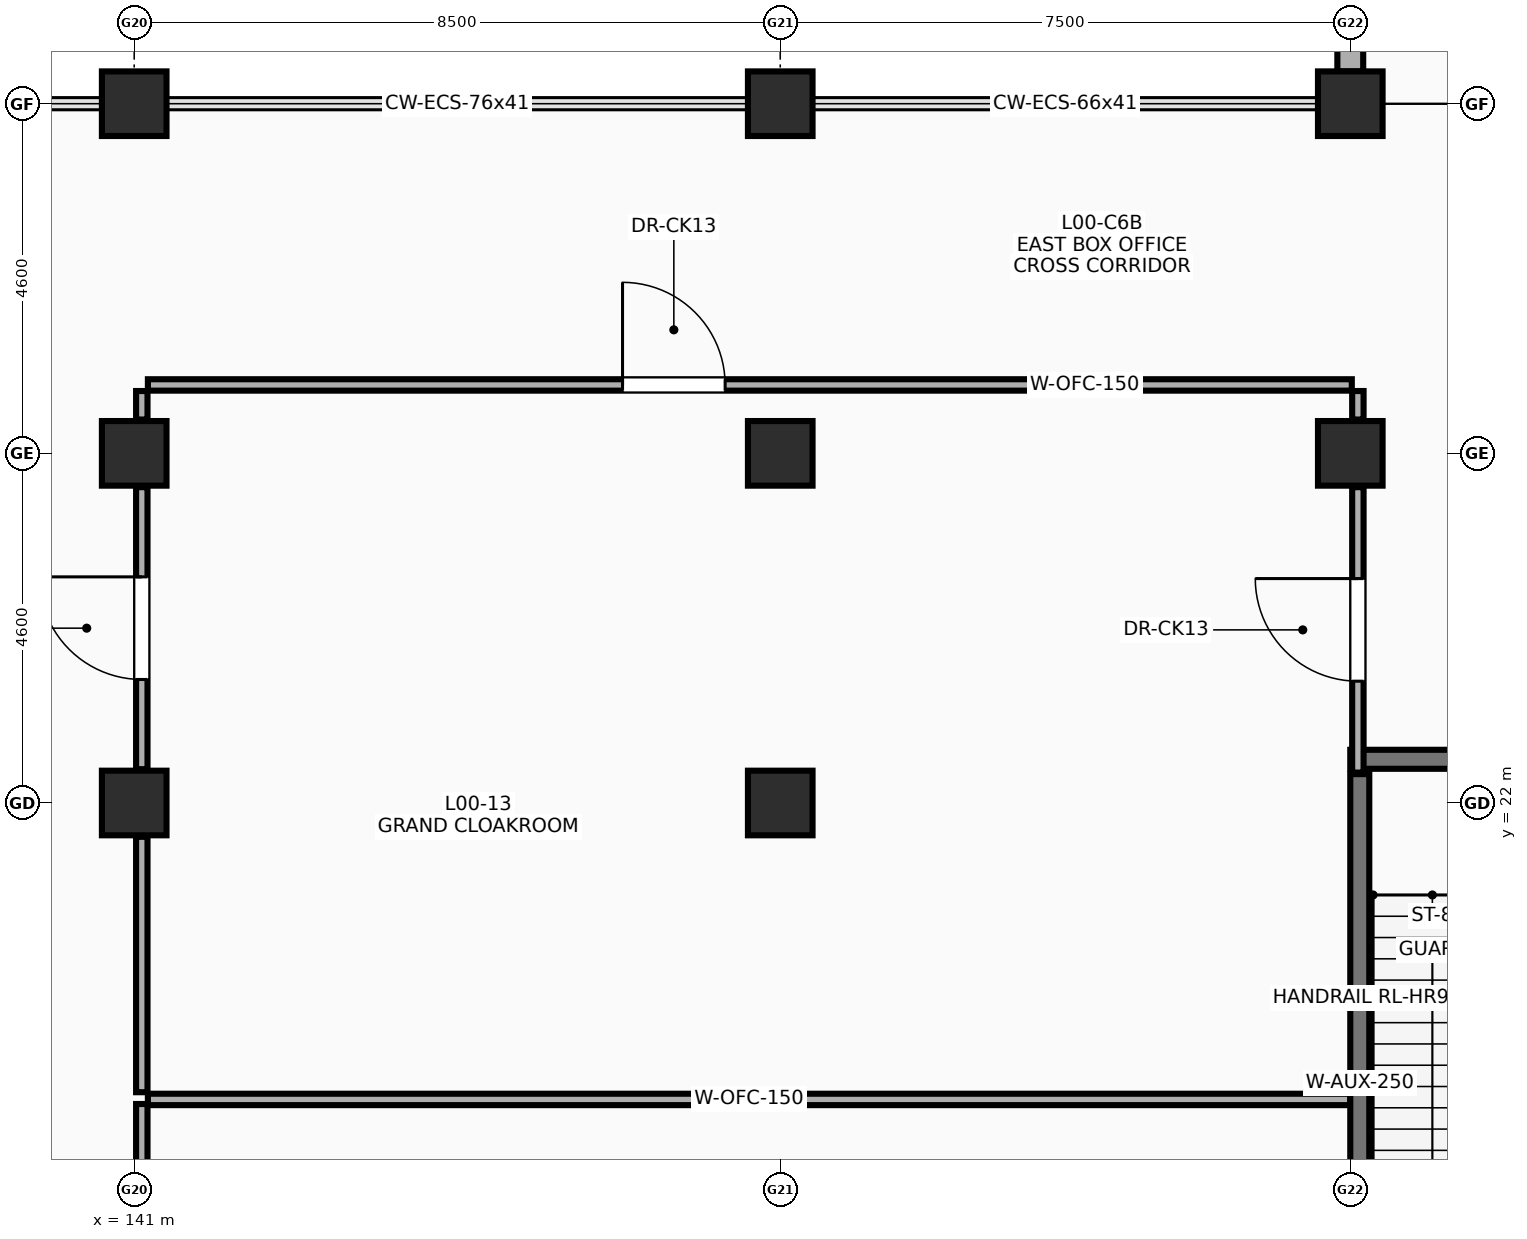
"""IFC4 building model, lengths in metres.
Left out: names, types, materials, properties, quantities, classifications, styles, units other than length and angle.
Written with IfcOpenShell. Run it as: python <this file> out.ifc"""

import sys

from ifc_helpers import new_model, si_unit, direction, frame, frame_2d, origin, origin_2d, place, context, subcontext, project, spatial, rectangle, extrude, element, fill, save


model = new_model("IFC4")
c1 = context("Model", 3, precision=1e-05, world=origin(), true_north=direction((0.0, 1.0)))
c2 = subcontext(c1, "Body", "Model", "MODEL_VIEW")
j1 = project(units=[si_unit("LENGTHUNIT", "METRE"), si_unit("PLANEANGLEUNIT", "RADIAN")], contexts=[c1])
p1 = place(None, origin())
s1 = spatial("IfcSite", under=j1, at=p1, CompositionType="ELEMENT")
p2 = place(p1, origin())
s2 = spatial("IfcBuilding", under=s1, at=p2, CompositionType="ELEMENT")
p3 = place(p2, origin())
s3 = spatial("IfcBuildingStorey", under=s2, at=p3, CompositionType="ELEMENT", Elevation=0.0)
for number, where, z_axis, x_axis in (
    (1, (141.0, 22.0, 0.0), (0.0, 0.0, 1.0), (1.0, 0.0, 0.0)),
    (2, (141.0, 26.6, 0.0), (0.0, 0.0, 1.0), (1.0, 0.0, 0.0)),
    (3, (141.0, 31.2, 0.0), (0.0, 0.0, 1.0), (1.0, 0.0, 0.0)),
    (4, (149.5, 22.0, 0.0), (0.0, 0.0, 1.0), (1.0, 0.0, 0.0)),
    (5, (149.5, 26.6, 0.0), (0.0, 0.0, 1.0), (1.0, 0.0, 0.0)),
    (6, (149.5, 31.2, 0.0), (0.0, 0.0, 1.0), (1.0, 0.0, 0.0)),
    (7, (157.0, 26.6, 0.0), (0.0, 0.0, 1.0), (1.0, 0.0, 0.0)),
    (8, (157.0, 31.2, 0.0), (0.0, 0.0, 1.0), (1.0, 0.0, 0.0)),
):
    element("IfcColumn", number, at=place(p3, frame(where, z_axis=z_axis, x_axis=x_axis)), inside=s3, PredefinedType="COLUMN", context=c2, shape_type="SweptSolid", body=[
        extrude(rectangle(XDim=0.85, YDim=0.85, at=origin_2d()), origin(), (0.0, 0.0, 1.0), 5.4),
    ])
p4 = place(p3, frame((157.0, 31.625, 0.0), z_axis=(0.0, 0.0, 1.0), x_axis=(0.0, 1.0, 0.0)))
e9 = element("IfcWall", 9, at=p4, inside=s3, PredefinedType="SOLIDWALL", context=c2, shape_type="SweptSolid", body=[
    extrude(rectangle(XDim=3.75, YDim=0.34, at=frame_2d((1.875, 0.0))), origin(), (0.0, 0.0, 1.0), 4.15),
])
p5 = place(p3, frame((157.0, 22.575, 0.0), z_axis=(0.0, 0.0, 1.0), x_axis=(1.0, 0.0, 0.0)))
e10 = element("IfcWall", 10, at=p5, inside=s3, PredefinedType="SHEAR", context=c2, shape_type="SweptSolid", body=[
    extrude(rectangle(XDim=4.1, YDim=0.25, at=frame_2d((2.05, 0.0))), origin(), (0.0, 0.0, 1.0), 5.4),
])
p6 = place(p5, frame((1.45, 0.0, 0.0)))
e11 = element("IfcOpeningElement", 11, at=p6, cuts=e10, PredefinedType="OPENING", context=c2, shape_type="SweptSolid", body=[
    extrude(rectangle(XDim=1.2, YDim=2.15, at=frame_2d((0.6, 1.075))), frame((0.0, 0.135, 0.0), z_axis=(0.0, -1.0, 0.0), x_axis=(1.0, 0.0, 0.0)), (0.0, 0.0, 1.0), 0.27),
])
p7 = place(p3, frame((141.18, 18.1, 0.0), z_axis=(0.0, 0.0, 1.0), x_axis=(1.0, 0.0, 0.0)))
e12 = element("IfcWall", 12, at=p7, inside=s3, PredefinedType="PARTITIONING", context=c2, shape_type="SweptSolid", body=[
    extrude(rectangle(XDim=15.82, YDim=0.15, at=frame_2d((7.91, 0.0))), origin(), (0.0, 0.0, 1.0), 3.9),
])
p8 = place(p3, frame((141.1, 14.4, 0.0), z_axis=(0.0, 0.0, 1.0), x_axis=(0.0, 1.0, 0.0)))
e13 = element("IfcWall", 13, at=p8, inside=s3, PredefinedType="PARTITIONING", context=c2, shape_type="SweptSolid", body=[
    extrude(rectangle(XDim=3.64, YDim=0.15, at=frame_2d((1.82, 0.0))), origin(), (0.0, 0.0, 1.0), 4.2),
])
p9 = place(p8, frame((1.175, 0.0, 0.0)))
e14 = element("IfcOpeningElement", 14, at=p9, cuts=e13, PredefinedType="OPENING", context=c2, shape_type="SweptSolid", body=[
    extrude(rectangle(XDim=1.25, YDim=2.15, at=frame_2d((0.625, 1.075))), frame((0.0, 0.085, 0.0), z_axis=(0.0, -1.0, 0.0), x_axis=(1.0, 0.0, 0.0)), (0.0, 0.0, 1.0), 0.17),
])
p10 = place(p3, frame((141.1, 22.445, 0.0), z_axis=(0.0, 0.0, 1.0), x_axis=(0.0, 1.0, 0.0)))
e15 = element("IfcWall", 15, at=p10, inside=s3, PredefinedType="PARTITIONING", context=c2, shape_type="SweptSolid", body=[
    extrude(rectangle(XDim=3.71, YDim=0.15, at=frame_2d((1.855, 0.0))), origin(), (0.0, 0.0, 1.0), 4.4),
])
p11 = place(p10, frame((1.18, 0.0, 0.0)))
e16 = element("IfcOpeningElement", 16, at=p11, cuts=e15, PredefinedType="OPENING", context=c2, shape_type="SweptSolid", body=[
    extrude(rectangle(XDim=1.35, YDim=2.15, at=frame_2d((0.675, 1.075))), frame((0.0, 0.085, 0.0), z_axis=(0.0, -1.0, 0.0), x_axis=(1.0, 0.0, 0.0)), (0.0, 0.0, 1.0), 0.17),
])
p12 = place(p3, frame((141.1, 27.045, 0.0), z_axis=(0.0, 0.0, 1.0), x_axis=(0.0, 1.0, 0.0)))
e17 = element("IfcWall", 17, at=p12, inside=s3, PredefinedType="PARTITIONING", context=c2, shape_type="SweptSolid", body=[
    extrude(rectangle(XDim=0.375, YDim=0.15, at=frame_2d((0.188, 0.0))), origin(), (0.0, 0.0, 1.0), 4.4),
])
p13 = place(p3, frame((141.18, 27.5, 0.0), z_axis=(0.0, 0.0, 1.0), x_axis=(1.0, 0.0, 0.0)))
e18 = element("IfcWall", 18, at=p13, inside=s3, PredefinedType="PARTITIONING", context=c2, shape_type="SweptSolid", body=[
    extrude(rectangle(XDim=15.84, YDim=0.15, at=frame_2d((7.92, 0.0))), origin(), (0.0, 0.0, 1.0), 4.4),
])
p14 = place(p13, frame((6.245, 0.0, 0.0)))
e19 = element("IfcOpeningElement", 19, at=p14, cuts=e18, PredefinedType="OPENING", context=c2, shape_type="SweptSolid", body=[
    extrude(rectangle(XDim=1.35, YDim=2.15, at=frame_2d((0.675, 1.075))), frame((0.0, 0.085, 0.0), z_axis=(0.0, -1.0, 0.0), x_axis=(1.0, 0.0, 0.0)), (0.0, 0.0, 1.0), 0.17),
])
p15 = place(p3, frame((157.1, 22.4, 0.0), z_axis=(0.0, 0.0, 1.0), x_axis=(0.0, 1.0, 0.0)))
e20 = element("IfcWall", 20, at=p15, inside=s3, PredefinedType="PARTITIONING", context=c2, shape_type="SweptSolid", body=[
    extrude(rectangle(XDim=3.755, YDim=0.15, at=frame_2d((1.877, 0.0))), origin(), (0.0, 0.0, 1.0), 3.9),
])
p16 = place(p15, frame((1.202, 0.0, 0.0)))
e21 = element("IfcOpeningElement", 21, at=p16, cuts=e20, PredefinedType="OPENING", context=c2, shape_type="SweptSolid", body=[
    extrude(rectangle(XDim=1.35, YDim=2.15, at=frame_2d((0.675, 1.075))), frame((0.0, 0.085, 0.0), z_axis=(0.0, -1.0, 0.0), x_axis=(1.0, 0.0, 0.0)), (0.0, 0.0, 1.0), 0.17),
])
p17 = place(p3, frame((157.1, 27.045, 0.0), z_axis=(0.0, 0.0, 1.0), x_axis=(0.0, 1.0, 0.0)))
e22 = element("IfcWall", 22, at=p17, inside=s3, PredefinedType="PARTITIONING", context=c2, shape_type="SweptSolid", body=[
    extrude(rectangle(XDim=0.375, YDim=0.15, at=frame_2d((0.188, 0.0))), origin(), (0.0, 0.0, 1.0), 4.4),
])
p18 = place(p3, frame((157.125, 14.25, 0.0), z_axis=(0.0, 0.0, 1.0), x_axis=(0.0, 1.0, 0.0)))
e23 = element("IfcWall", 23, at=p18, inside=s3, PredefinedType="SHEAR", context=c2, shape_type="SweptSolid", body=[
    extrude(rectangle(XDim=8.13, YDim=0.25, at=frame_2d((4.065, 0.0))), origin(), (0.0, 0.0, 1.0), 5.4),
])
p19 = place(p3, frame((141.1, 18.195, 0.0), z_axis=(0.0, 0.0, 1.0), x_axis=(0.0, 1.0, 0.0)))
e24 = element("IfcWall", 24, at=p19, inside=s3, PredefinedType="PARTITIONING", context=c2, shape_type="SweptSolid", body=[
    extrude(rectangle(XDim=3.36, YDim=0.15, at=frame_2d((1.68, 0.0))), origin(), (0.0, 0.0, 1.0), 4.2),
])
p20 = place(p11, origin())
e25 = element("IfcDoor", 25, at=p20, inside=s3, OperationType="SINGLE_SWING_RIGHT", PredefinedType="DOOR", context=c2, shape_type="SweptSolid", body=[
    extrude(rectangle(XDim=1.35, YDim=2.15, at=frame_2d((0.675, 1.075))), frame((0.0, 0.025, 0.0), z_axis=(0.0, -1.0, 0.0), x_axis=(1.0, 0.0, 0.0)), (0.0, 0.0, 1.0), 0.05),
])
fill(e16, e25)
p21 = place(p14, origin())
e26 = element("IfcDoor", 26, at=p21, inside=s3, OperationType="SINGLE_SWING_LEFT", PredefinedType="DOOR", context=c2, shape_type="SweptSolid", body=[
    extrude(rectangle(XDim=1.35, YDim=2.15, at=frame_2d((0.675, 1.075))), frame((0.0, 0.025, 0.0), z_axis=(0.0, -1.0, 0.0), x_axis=(1.0, 0.0, 0.0)), (0.0, 0.0, 1.0), 0.05),
])
fill(e19, e26)
p22 = place(p16, origin())
e27 = element("IfcDoor", 27, at=p22, inside=s3, OperationType="SINGLE_SWING_RIGHT", PredefinedType="DOOR", context=c2, shape_type="SweptSolid", body=[
    extrude(rectangle(XDim=1.35, YDim=2.15, at=frame_2d((0.675, 1.075))), frame((0.0, 0.025, 0.0), z_axis=(0.0, -1.0, 0.0), x_axis=(1.0, 0.0, 0.0)), (0.0, 0.0, 1.0), 0.05),
])
fill(e21, e27)
save(model, sys.argv[1])
